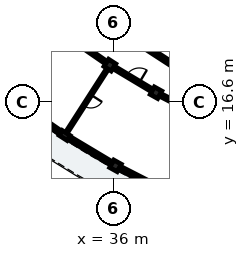
"""IFC4 building model, lengths in metres.
Left out: names, types, materials, properties, quantities, classifications, styles, units other than length and angle.
Written with IfcOpenShell. Run it as: python <this file> out.ifc"""

import sys

from ifc_helpers import new_model, si_unit, direction, frame, frame_2d, origin, origin_2d, place, context, subcontext, project, spatial, rectangle, extrude, element, fill, save


model = new_model("IFC4")
c1 = context("Model", 3, precision=1e-05, world=origin(), true_north=direction((0.0, 1.0)))
c2 = subcontext(c1, "Body", "Model", "MODEL_VIEW")
j1 = project(units=[si_unit("LENGTHUNIT", "METRE"), si_unit("PLANEANGLEUNIT", "RADIAN")], contexts=[c1])
p1 = place(None, origin())
s1 = spatial("IfcSite", under=j1, at=p1, CompositionType="ELEMENT")
p2 = place(p1, origin())
s2 = spatial("IfcBuilding", under=s1, at=p2, CompositionType="ELEMENT")
p3 = place(p2, frame((0.0, 0.0, 15.56)))
s3 = spatial("IfcBuildingStorey", under=s2, at=p3, CompositionType="ELEMENT", Elevation=15.56)
p4 = place(p3, frame((40.449, 18.709, 0.0), z_axis=(0.0, 0.0, 1.0), x_axis=(-0.838678407117, 0.544626963559, 0.0)))
e1 = element("IfcWall", 1, at=p4, inside=s3, PredefinedType="SHEAR", context=c2, shape_type="SweptSolid", body=[
    extrude(rectangle(XDim=3.42, YDim=0.25, at=frame_2d((1.71, 0.0))), origin(), (0.0, 0.0, 1.0), 3.11),
])
p5 = place(p3, frame((35.76, 19.042, 0.0), z_axis=(0.0, 0.0, 1.0), x_axis=(-0.540974471368, -0.841039012964, 0.0)))
e2 = element("IfcColumn", 2, at=p5, inside=s3, PredefinedType="COLUMN", context=c2, shape_type="SweptSolid", body=[
    extrude(rectangle(XDim=0.56, YDim=0.56, at=origin_2d()), origin(), (0.0, 0.0, 1.0), 3.11),
])
p6 = place(p3, frame((32.785, 14.416, 0.0), z_axis=(0.0, 0.0, 1.0), x_axis=(-0.540974471368, -0.841039012964, 0.0)))
e3 = element("IfcColumn", 3, at=p6, inside=s3, PredefinedType="PILASTER", context=c2, shape_type="SweptSolid", body=[
    extrude(rectangle(XDim=0.38, YDim=0.62, at=origin_2d()), origin(), (0.0, 0.0, 1.0), 3.11),
])
for number, where, z_axis, x_axis in (
    (4, (38.796, 17.227, 0.0), (0.0, 0.0, 1.0), (-0.485, -0.875, 0.0)),
    (5, (36.13, 12.417, 0.0), (0.0, 0.0, 1.0), (-0.485, -0.875, 0.0)),
):
    element("IfcColumn", number, at=place(p3, frame(where, z_axis=z_axis, x_axis=x_axis)), inside=s3, PredefinedType="COLUMN", context=c2, shape_type="SweptSolid", body=[
        extrude(rectangle(XDim=0.56, YDim=0.56, at=origin_2d()), origin(), (0.0, 0.0, 1.0), 3.11),
    ])
p7 = place(p3, frame((29.784, 16.488, 0.0), z_axis=(0.0, 0.0, 1.0), x_axis=(0.822902356734, -0.568182815017, 0.0)))
e6 = element("IfcWall", 6, at=p7, inside=s3, PredefinedType="SOLIDWALL", context=c2, shape_type="SweptSolid", body=[
    extrude(rectangle(XDim=3.487, YDim=0.245, at=frame_2d((1.743, 0.0))), origin(), (0.0, 0.0, 1.0), 2.355),
])
p8 = place(p7, frame((1.203, 0.0, 0.0)))
e7 = element("IfcOpeningElement", 7, at=p8, cuts=e6, PredefinedType="OPENING", context=c2, shape_type="SweptSolid", body=[
    extrude(rectangle(XDim=1.08, YDim=2.15, at=frame_2d((0.54, 1.075))), frame((0.0, 0.133, 0.0), z_axis=(0.0, -1.0, 0.0), x_axis=(1.0, 0.0, 0.0)), (0.0, 0.0, 1.0), 0.265),
])
p9 = place(p3, frame((32.922, 14.334, 0.0), z_axis=(0.0, 0.0, 1.0), x_axis=(0.858288874148, -0.513166842766, 0.0)))
e8 = element("IfcWall", 8, at=p9, inside=s3, PredefinedType="SOLIDWALL", context=c2, shape_type="SweptSolid", body=[
    extrude(rectangle(XDim=3.487, YDim=0.245, at=frame_2d((1.743, 0.0))), origin(), (0.0, 0.0, 1.0), 2.355),
])
p10 = place(p9, frame((0.893, 0.0, 0.35)))
e9 = element("IfcOpeningElement", 9, at=p10, cuts=e8, PredefinedType="OPENING", context=c2, shape_type="SweptSolid", body=[
    extrude(rectangle(XDim=1.7, YDim=1.8, at=frame_2d((0.85, 0.9))), frame((0.0, 0.133, 0.0), z_axis=(0.0, -1.0, 0.0), x_axis=(1.0, 0.0, 0.0)), (0.0, 0.0, 1.0), 0.265),
])
p11 = place(p3, frame((36.352, 12.302, 0.0), z_axis=(0.0, 0.0, 1.0), x_axis=(0.890001092753, -0.45595839163, 0.0)))
e10 = element("IfcWall", 10, at=p11, inside=s3, PredefinedType="SOLIDWALL", context=c2, shape_type="SweptSolid", body=[
    extrude(rectangle(XDim=3.487, YDim=0.245, at=frame_2d((1.743, 0.0))), origin(), (0.0, 0.0, 1.0), 2.355),
])
p12 = place(p11, frame((1.203, 0.0, 0.55)))
e11 = element("IfcOpeningElement", 11, at=p12, cuts=e10, PredefinedType="OPENING", context=c2, shape_type="SweptSolid", body=[
    extrude(rectangle(XDim=1.08, YDim=1.45, at=frame_2d((0.54, 0.725))), frame((0.0, 0.133, 0.0), z_axis=(0.0, -1.0, 0.0), x_axis=(1.0, 0.0, 0.0)), (0.0, 0.0, 1.0), 0.265),
])
p13 = place(p3, frame((33.138, 20.853, 0.0), z_axis=(0.0, 0.0, 1.0), x_axis=(0.822870075235, -0.568229565653, 0.0)))
e12 = element("IfcWall", 12, at=p13, inside=s3, PredefinedType="PARTITIONING", context=c2, shape_type="SweptSolid", body=[
    extrude(rectangle(XDim=2.837, YDim=0.195, at=frame_2d((1.418, 0.0))), origin(), (0.0, 0.0, 1.0), 2.37),
])
p14 = place(p13, frame((0.924, 0.0, 0.0)))
e13 = element("IfcOpeningElement", 13, at=p14, cuts=e12, PredefinedType="OPENING", context=c2, shape_type="SweptSolid", body=[
    extrude(rectangle(XDim=0.99, YDim=2.16, at=frame_2d((0.495, 1.08))), frame((0.0, 0.107, 0.0), z_axis=(0.0, -1.0, 0.0), x_axis=(1.0, 0.0, 0.0)), (0.0, 0.0, 1.0), 0.215),
])
p15 = place(p3, frame((35.544, 18.705, 0.0), z_axis=(0.0, 0.0, 1.0), x_axis=(-0.540959731567, -0.84104849374, 0.0)))
e14 = element("IfcWall", 14, at=p15, inside=s3, PredefinedType="PARTITIONING", context=c2, shape_type="SweptSolid", body=[
    extrude(rectangle(XDim=4.7, YDim=0.125, at=frame_2d((2.35, 0.0))), origin(), (0.0, 0.0, 1.0), 2.37),
])
p16 = place(p15, frame((1.915, 0.0, 0.0)))
e15 = element("IfcOpeningElement", 15, at=p16, cuts=e14, PredefinedType="OPENING", context=c2, shape_type="SweptSolid", body=[
    extrude(rectangle(XDim=0.87, YDim=2.08, at=frame_2d((0.435, 1.04))), frame((0.0, 0.073, 0.0), z_axis=(0.0, -1.0, 0.0), x_axis=(1.0, 0.0, 0.0)), (0.0, 0.0, 1.0), 0.145),
])
p17 = place(p3, frame((36.061, 18.862, 0.0), z_axis=(0.0, 0.0, 1.0), x_axis=(0.858281647443, -0.51317892948, 0.0)))
e16 = element("IfcWall", 16, at=p17, inside=s3, PredefinedType="PARTITIONING", context=c2, shape_type="SweptSolid", body=[
    extrude(rectangle(XDim=2.837, YDim=0.195, at=frame_2d((1.418, 0.0))), origin(), (0.0, 0.0, 1.0), 2.37),
])
p18 = place(p17, frame((0.934, 0.0, 0.0)))
e17 = element("IfcOpeningElement", 17, at=p18, cuts=e16, PredefinedType="OPENING", context=c2, shape_type="SweptSolid", body=[
    extrude(rectangle(XDim=0.97, YDim=2.15, at=frame_2d((0.485, 1.075))), frame((0.0, 0.107, 0.0), z_axis=(0.0, -1.0, 0.0), x_axis=(1.0, 0.0, 0.0)), (0.0, 0.0, 1.0), 0.215),
])
p19 = place(p3, frame((39.107, 17.067, 0.0), z_axis=(0.0, 0.0, 1.0), x_axis=(0.890030590607, -0.45590080915, 0.0)))
e18 = element("IfcWall", 18, at=p19, inside=s3, PredefinedType="PARTITIONING", context=c2, shape_type="SweptSolid", body=[
    extrude(rectangle(XDim=2.837, YDim=0.195, at=frame_2d((1.418, 0.0))), origin(), (0.0, 0.0, 1.0), 2.37),
])
p20 = place(p19, frame((0.944, 0.0, 0.0)))
e19 = element("IfcOpeningElement", 19, at=p20, cuts=e18, PredefinedType="OPENING", context=c2, shape_type="SweptSolid", body=[
    extrude(rectangle(XDim=0.95, YDim=2.13, at=frame_2d((0.475, 1.065))), frame((0.0, 0.107, 0.0), z_axis=(0.0, -1.0, 0.0), x_axis=(1.0, 0.0, 0.0)), (0.0, 0.0, 1.0), 0.215),
])
p21 = place(p10, origin())
e20 = element("IfcWindow", 20, at=p21, inside=s3, PartitioningType="SINGLE_PANEL", PredefinedType="WINDOW", context=c2, shape_type="SweptSolid", body=[
    extrude(rectangle(XDim=1.7, YDim=1.8, at=frame_2d((0.85, 0.9))), frame((0.0, 0.03, 0.0), z_axis=(0.0, -1.0, 0.0), x_axis=(1.0, 0.0, 0.0)), (0.0, 0.0, 1.0), 0.06),
])
fill(e9, e20)
p22 = place(p12, origin())
e21 = element("IfcWindow", 21, at=p22, inside=s3, PartitioningType="SINGLE_PANEL", PredefinedType="WINDOW", context=c2, shape_type="SweptSolid", body=[
    extrude(rectangle(XDim=1.08, YDim=1.45, at=frame_2d((0.54, 0.725))), frame((0.0, 0.03, 0.0), z_axis=(0.0, -1.0, 0.0), x_axis=(1.0, 0.0, 0.0)), (0.0, 0.0, 1.0), 0.06),
])
fill(e11, e21)
p23 = place(p14, origin())
e22 = element("IfcDoor", 22, at=p23, inside=s3, OperationType="SINGLE_SWING_LEFT", PredefinedType="DOOR", context=c2, shape_type="SweptSolid", body=[
    extrude(rectangle(XDim=0.99, YDim=2.16, at=frame_2d((0.495, 1.08))), frame((0.0, 0.025, 0.0), z_axis=(0.0, -1.0, 0.0), x_axis=(1.0, 0.0, 0.0)), (0.0, 0.0, 1.0), 0.05),
])
fill(e13, e22)
p24 = place(p16, origin())
e23 = element("IfcDoor", 23, at=p24, inside=s3, OperationType="SINGLE_SWING_LEFT", PredefinedType="DOOR", context=c2, shape_type="SweptSolid", body=[
    extrude(rectangle(XDim=0.87, YDim=2.08, at=frame_2d((0.435, 1.04))), frame((0.0, 0.025, 0.0), z_axis=(0.0, -1.0, 0.0), x_axis=(1.0, 0.0, 0.0)), (0.0, 0.0, 1.0), 0.05),
])
fill(e15, e23)
p25 = place(p18, origin())
e24 = element("IfcDoor", 24, at=p25, inside=s3, OperationType="SINGLE_SWING_RIGHT", PredefinedType="DOOR", context=c2, shape_type="SweptSolid", body=[
    extrude(rectangle(XDim=0.97, YDim=2.15, at=frame_2d((0.485, 1.075))), frame((0.0, 0.025, 0.0), z_axis=(0.0, -1.0, 0.0), x_axis=(1.0, 0.0, 0.0)), (0.0, 0.0, 1.0), 0.05),
])
fill(e17, e24)
save(model, sys.argv[1])
